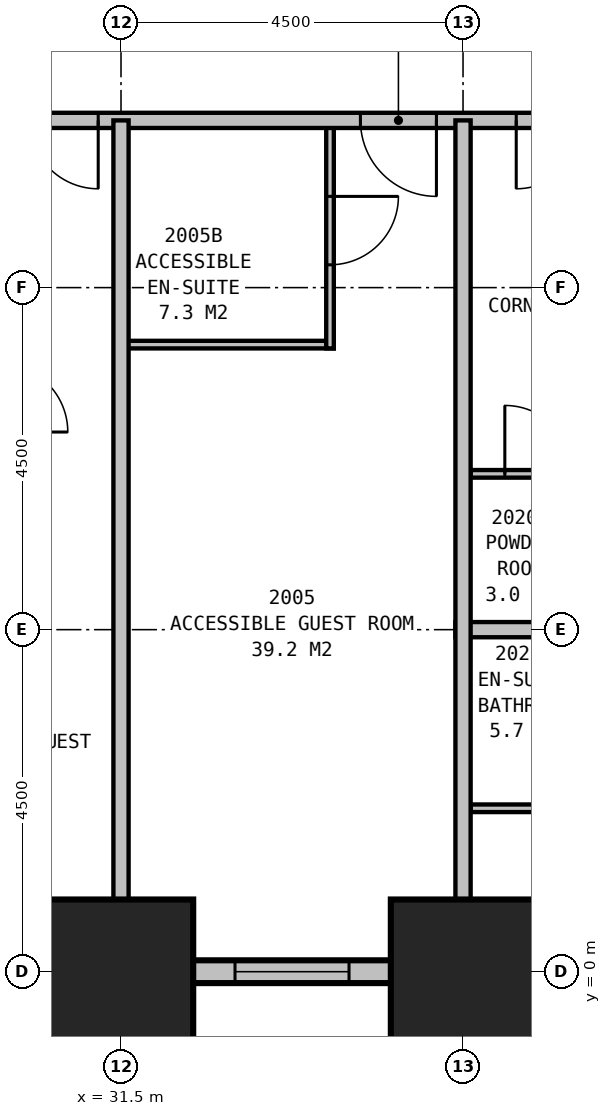
"""IFC4 building model, lengths in metres.
Left out: names, types, materials, properties, quantities, classifications, styles, units other than length and angle.
Written with IfcOpenShell. Run it as: python <this file> out.ifc"""

import sys

from ifc_helpers import new_model, si_unit, direction, frame, frame_2d, origin, origin_2d, place, context, subcontext, project, spatial, rectangle, extrude, element, fill, save


model = new_model("IFC4")
c1 = context("Model", 3, precision=1e-05, world=origin(), true_north=direction((0.0, 1.0)))
c2 = subcontext(c1, "Body", "Model", "MODEL_VIEW")
j1 = project(units=[si_unit("LENGTHUNIT", "METRE"), si_unit("PLANEANGLEUNIT", "RADIAN")], contexts=[c1])
p1 = place(None, origin())
s1 = spatial("IfcSite", under=j1, at=p1, CompositionType="ELEMENT")
p2 = place(p1, origin())
s2 = spatial("IfcBuilding", under=s1, at=p2, CompositionType="ELEMENT")
p3 = place(p2, frame((0.0, 0.0, 82.2)))
s3 = spatial("IfcBuildingStorey", under=s2, at=p3, CompositionType="ELEMENT", Elevation=82.2)
for number, where, z_axis, x_axis in (
    (1, (31.5, 0.0, 0.0), (0.0, 0.0, 1.0), (1.0, 0.0, 0.0)),
    (2, (36.0, 0.0, 0.0), (0.0, 0.0, 1.0), (1.0, 0.0, 0.0)),
):
    element("IfcColumn", number, at=place(p3, frame(where, z_axis=z_axis, x_axis=x_axis)), inside=s3, PredefinedType="COLUMN", context=c2, shape_type="SweptSolid", body=[
        extrude(rectangle(XDim=1.9, YDim=1.9, at=origin_2d()), origin(), (0.0, 0.0, 1.0), 3.5),
    ])
p4 = place(p3, frame((4.35, 0.0, 0.0), z_axis=(0.0, 0.0, 1.0), x_axis=(1.0, 0.0, 0.0)))
e3 = element("IfcWall", 3, at=p4, inside=s3, PredefinedType="STANDARD", context=c2, shape_type="SweptSolid", body=[
    extrude(rectangle(XDim=40.8, YDim=0.3, at=frame_2d((20.4, 0.0))), origin(), (0.0, 0.0, 1.0), 2.1),
])
p5 = place(p4, frame((1.65, 0.0, 0.5)))
e4 = element("IfcOpeningElement", 4, at=p5, cuts=e3, PredefinedType="OPENING", context=c2, shape_type="SweptSolid", body=[
    extrude(rectangle(XDim=1.5, YDim=1.4, at=frame_2d((0.75, 0.7))), frame((0.0, 0.16, 0.0), z_axis=(0.0, -1.0, 0.0), x_axis=(1.0, 0.0, 0.0)), (0.0, 0.0, 1.0), 0.32),
])
p6 = place(p4, frame((6.15, 0.0, 0.5)))
e5 = element("IfcOpeningElement", 5, at=p6, cuts=e3, PredefinedType="OPENING", context=c2, shape_type="SweptSolid", body=[
    extrude(rectangle(XDim=1.5, YDim=1.4, at=frame_2d((0.75, 0.7))), frame((0.0, 0.16, 0.0), z_axis=(0.0, -1.0, 0.0), x_axis=(1.0, 0.0, 0.0)), (0.0, 0.0, 1.0), 0.32),
])
p7 = place(p4, frame((10.65, 0.0, 0.5)))
e6 = element("IfcOpeningElement", 6, at=p7, cuts=e3, PredefinedType="OPENING", context=c2, shape_type="SweptSolid", body=[
    extrude(rectangle(XDim=1.5, YDim=1.4, at=frame_2d((0.75, 0.7))), frame((0.0, 0.16, 0.0), z_axis=(0.0, -1.0, 0.0), x_axis=(1.0, 0.0, 0.0)), (0.0, 0.0, 1.0), 0.32),
])
p8 = place(p4, frame((15.15, 0.0, 0.5)))
e7 = element("IfcOpeningElement", 7, at=p8, cuts=e3, PredefinedType="OPENING", context=c2, shape_type="SweptSolid", body=[
    extrude(rectangle(XDim=1.5, YDim=1.4, at=frame_2d((0.75, 0.7))), frame((0.0, 0.16, 0.0), z_axis=(0.0, -1.0, 0.0), x_axis=(1.0, 0.0, 0.0)), (0.0, 0.0, 1.0), 0.32),
])
p9 = place(p4, frame((19.65, 0.0, 0.5)))
e8 = element("IfcOpeningElement", 8, at=p9, cuts=e3, PredefinedType="OPENING", context=c2, shape_type="SweptSolid", body=[
    extrude(rectangle(XDim=1.5, YDim=1.4, at=frame_2d((0.75, 0.7))), frame((0.0, 0.16, 0.0), z_axis=(0.0, -1.0, 0.0), x_axis=(1.0, 0.0, 0.0)), (0.0, 0.0, 1.0), 0.32),
])
p10 = place(p4, frame((24.15, 0.0, 0.5)))
e9 = element("IfcOpeningElement", 9, at=p10, cuts=e3, PredefinedType="OPENING", context=c2, shape_type="SweptSolid", body=[
    extrude(rectangle(XDim=1.5, YDim=1.4, at=frame_2d((0.75, 0.7))), frame((0.0, 0.16, 0.0), z_axis=(0.0, -1.0, 0.0), x_axis=(1.0, 0.0, 0.0)), (0.0, 0.0, 1.0), 0.32),
])
p11 = place(p4, frame((28.65, 0.0, 0.5)))
e10 = element("IfcOpeningElement", 10, at=p11, cuts=e3, PredefinedType="OPENING", context=c2, shape_type="SweptSolid", body=[
    extrude(rectangle(XDim=1.5, YDim=1.4, at=frame_2d((0.75, 0.7))), frame((0.0, 0.16, 0.0), z_axis=(0.0, -1.0, 0.0), x_axis=(1.0, 0.0, 0.0)), (0.0, 0.0, 1.0), 0.32),
])
p12 = place(p4, frame((33.15, 0.0, 0.5)))
e11 = element("IfcOpeningElement", 11, at=p12, cuts=e3, PredefinedType="OPENING", context=c2, shape_type="SweptSolid", body=[
    extrude(rectangle(XDim=1.5, YDim=1.4, at=frame_2d((0.75, 0.7))), frame((0.0, 0.16, 0.0), z_axis=(0.0, -1.0, 0.0), x_axis=(1.0, 0.0, 0.0)), (0.0, 0.0, 1.0), 0.32),
])
p13 = place(p4, frame((37.65, 0.0, 0.5)))
e12 = element("IfcOpeningElement", 12, at=p13, cuts=e3, PredefinedType="OPENING", context=c2, shape_type="SweptSolid", body=[
    extrude(rectangle(XDim=1.5, YDim=1.4, at=frame_2d((0.75, 0.7))), frame((0.0, 0.16, 0.0), z_axis=(0.0, -1.0, 0.0), x_axis=(1.0, 0.0, 0.0)), (0.0, 0.0, 1.0), 0.32),
])
p14 = place(p3, frame((11.2, 11.2, 0.0), z_axis=(0.0, 0.0, 1.0), x_axis=(1.0, 0.0, 0.0)))
e13 = element("IfcWall", 13, at=p14, inside=s3, PredefinedType="PARTITIONING", context=c2, shape_type="SweptSolid", body=[
    extrude(rectangle(XDim=27.1, YDim=0.2, at=frame_2d((13.55, 0.0))), origin(), (0.0, 0.0, 1.0), 3.25),
])
p15 = place(p14, frame((6.45, 0.0, 0.0), z_axis=(0.0, 0.0, 1.0), x_axis=(-1.0, 0.0, 0.0)))
e14 = element("IfcOpeningElement", 14, at=p15, cuts=e13, PredefinedType="OPENING", context=c2, shape_type="SweptSolid", body=[
    extrude(rectangle(XDim=1.0, YDim=2.1, at=frame_2d((0.5, 1.05))), frame((0.0, 0.11, 0.0), z_axis=(0.0, -1.0, 0.0), x_axis=(1.0, 0.0, 0.0)), (0.0, 0.0, 1.0), 0.22),
])
p16 = place(p14, frame((9.55, 0.0, 0.0), z_axis=(0.0, 0.0, 1.0), x_axis=(-1.0, 0.0, 0.0)))
e15 = element("IfcOpeningElement", 15, at=p16, cuts=e13, PredefinedType="OPENING", context=c2, shape_type="SweptSolid", body=[
    extrude(rectangle(XDim=0.9, YDim=2.1, at=frame_2d((0.45, 1.05))), frame((0.0, 0.11, 0.0), z_axis=(0.0, -1.0, 0.0), x_axis=(1.0, 0.0, 0.0)), (0.0, 0.0, 1.0), 0.22),
])
p17 = place(p14, frame((15.95, 0.0, 0.0), z_axis=(0.0, 0.0, 1.0), x_axis=(-1.0, 0.0, 0.0)))
e16 = element("IfcOpeningElement", 16, at=p17, cuts=e13, PredefinedType="OPENING", context=c2, shape_type="SweptSolid", body=[
    extrude(rectangle(XDim=0.9, YDim=2.1, at=frame_2d((0.45, 1.05))), frame((0.0, 0.11, 0.0), z_axis=(0.0, -1.0, 0.0), x_axis=(1.0, 0.0, 0.0)), (0.0, 0.0, 1.0), 0.22),
])
p18 = place(p14, frame((20.0, 0.0, 0.0), z_axis=(0.0, 0.0, 1.0), x_axis=(-1.0, 0.0, 0.0)))
e17 = element("IfcOpeningElement", 17, at=p18, cuts=e13, PredefinedType="OPENING", context=c2, shape_type="SweptSolid", body=[
    extrude(rectangle(XDim=0.9, YDim=2.1, at=frame_2d((0.45, 1.05))), frame((0.0, 0.11, 0.0), z_axis=(0.0, -1.0, 0.0), x_axis=(1.0, 0.0, 0.0)), (0.0, 0.0, 1.0), 0.22),
])
p19 = place(p14, frame((24.45, 0.0, 0.0), z_axis=(0.0, 0.0, 1.0), x_axis=(-1.0, 0.0, 0.0)))
e18 = element("IfcOpeningElement", 18, at=p19, cuts=e13, PredefinedType="OPENING", context=c2, shape_type="SweptSolid", body=[
    extrude(rectangle(XDim=1.0, YDim=2.1, at=frame_2d((0.5, 1.05))), frame((0.0, 0.11, 0.0), z_axis=(0.0, -1.0, 0.0), x_axis=(1.0, 0.0, 0.0)), (0.0, 0.0, 1.0), 0.22),
])
p20 = place(p14, frame((1.6, 0.0, 0.0), z_axis=(0.0, 0.0, 1.0), x_axis=(-1.0, 0.0, 0.0)))
e19 = element("IfcOpeningElement", 19, at=p20, cuts=e13, PredefinedType="OPENING", context=c2, shape_type="SweptSolid", body=[
    extrude(rectangle(XDim=0.9, YDim=2.1, at=frame_2d((0.45, 1.05))), frame((0.0, 0.11, 0.0), z_axis=(0.0, -1.0, 0.0), x_axis=(1.0, 0.0, 0.0)), (0.0, 0.0, 1.0), 0.22),
])
p21 = place(p14, frame((26.4, 0.0, 0.0), z_axis=(0.0, 0.0, 1.0), x_axis=(-1.0, 0.0, 0.0)))
e20 = element("IfcOpeningElement", 20, at=p21, cuts=e13, PredefinedType="OPENING", context=c2, shape_type="SweptSolid", body=[
    extrude(rectangle(XDim=0.9, YDim=2.1, at=frame_2d((0.45, 1.05))), frame((0.0, 0.11, 0.0), z_axis=(0.0, -1.0, 0.0), x_axis=(1.0, 0.0, 0.0)), (0.0, 0.0, 1.0), 0.22),
])
p22 = place(p3, frame((31.5, 11.2, 0.0), z_axis=(0.0, 0.0, 1.0), x_axis=(0.0, -1.0, 0.0)))
e21 = element("IfcWall", 21, at=p22, inside=s3, PredefinedType="PARTITIONING", context=c2, shape_type="SweptSolid", body=[
    extrude(rectangle(XDim=11.2, YDim=0.2, at=frame_2d((5.6, 0.0))), origin(), (0.0, 0.0, 1.0), 2.2),
])
p23 = place(p3, frame((31.5, 8.25, 0.0), z_axis=(0.0, 0.0, 1.0), x_axis=(1.0, 0.0, 0.0)))
e22 = element("IfcWall", 22, at=p23, inside=s3, PredefinedType="PLUMBINGWALL", context=c2, shape_type="SweptSolid", body=[
    extrude(rectangle(XDim=2.8, YDim=0.1, at=frame_2d((1.4, 0.0))), origin(), (0.0, 0.0, 1.0), 3.25),
])
p24 = place(p3, frame((34.25, 11.2, 0.0), z_axis=(0.0, 0.0, 1.0), x_axis=(0.0, -1.0, 0.0)))
e23 = element("IfcWall", 23, at=p24, inside=s3, PredefinedType="PLUMBINGWALL", context=c2, shape_type="SweptSolid", body=[
    extrude(rectangle(XDim=3.0, YDim=0.1, at=frame_2d((1.5, 0.0))), origin(), (0.0, 0.0, 1.0), 3.25),
])
p25 = place(p24, frame((1.0, 0.0, 0.0)))
e24 = element("IfcOpeningElement", 24, at=p25, cuts=e23, PredefinedType="OPENING", context=c2, shape_type="SweptSolid", body=[
    extrude(rectangle(XDim=0.9, YDim=2.1, at=frame_2d((0.45, 1.05))), frame((0.0, 0.06, 0.0), z_axis=(0.0, -1.0, 0.0), x_axis=(1.0, 0.0, 0.0)), (0.0, 0.0, 1.0), 0.12),
])
p26 = place(p3, frame((36.0, 11.2, 0.0), z_axis=(0.0, 0.0, 1.0), x_axis=(0.0, -1.0, 0.0)))
e25 = element("IfcWall", 25, at=p26, inside=s3, PredefinedType="PARTITIONING", context=c2, shape_type="SweptSolid", body=[
    extrude(rectangle(XDim=11.2, YDim=0.2, at=frame_2d((5.6, 0.0))), origin(), (0.0, 0.0, 1.0), 2.2),
])
p27 = place(p3, frame((35.9, 4.5, 0.0), z_axis=(0.0, 0.0, 1.0), x_axis=(1.0, 0.0, 0.0)))
e26 = element("IfcWall", 26, at=p27, inside=s3, PredefinedType="PARTITIONING", context=c2, shape_type="SweptSolid", body=[
    extrude(rectangle(XDim=9.1, YDim=0.2, at=frame_2d((4.55, 0.0))), origin(), (0.0, 0.0, 1.0), 3.25),
])
p28 = place(p27, frame((7.1, 0.0, 0.0)))
e27 = element("IfcOpeningElement", 27, at=p28, cuts=e26, PredefinedType="OPENING", context=c2, shape_type="SweptSolid", body=[
    extrude(rectangle(XDim=0.9, YDim=2.1, at=frame_2d((0.45, 1.05))), frame((0.0, 0.11, 0.0), z_axis=(0.0, -1.0, 0.0), x_axis=(1.0, 0.0, 0.0)), (0.0, 0.0, 1.0), 0.22),
])
p29 = place(p3, frame((36.1, 6.55, 0.0), z_axis=(0.0, 0.0, 1.0), x_axis=(1.0, 0.0, 0.0)))
e28 = element("IfcWall", 28, at=p29, inside=s3, PredefinedType="PLUMBINGWALL", context=c2, shape_type="SweptSolid", body=[
    extrude(rectangle(XDim=1.8, YDim=0.1, at=frame_2d((0.9, 0.0))), origin(), (0.0, 0.0, 1.0), 3.25),
])
p30 = place(p29, frame((0.45, 0.0, 0.0)))
e29 = element("IfcOpeningElement", 29, at=p30, cuts=e28, PredefinedType="OPENING", context=c2, shape_type="SweptSolid", body=[
    extrude(rectangle(XDim=0.9, YDim=2.1, at=frame_2d((0.45, 1.05))), frame((0.0, 0.06, 0.0), z_axis=(0.0, -1.0, 0.0), x_axis=(1.0, 0.0, 0.0)), (0.0, 0.0, 1.0), 0.12),
])
p31 = place(p3, frame((36.1, 2.15, 0.0), z_axis=(0.0, 0.0, 1.0), x_axis=(1.0, 0.0, 0.0)))
e30 = element("IfcWall", 30, at=p31, inside=s3, PredefinedType="PLUMBINGWALL", context=c2, shape_type="SweptSolid", body=[
    extrude(rectangle(XDim=2.7, YDim=0.1, at=frame_2d((1.35, 0.0))), origin(), (0.0, 0.0, 1.0), 3.25),
])
p32 = place(p31, frame((1.8, 0.0, 0.0), z_axis=(0.0, 0.0, 1.0), x_axis=(-1.0, 0.0, 0.0)))
e31 = element("IfcOpeningElement", 31, at=p32, cuts=e30, PredefinedType="OPENING", context=c2, shape_type="SweptSolid", body=[
    extrude(rectangle(XDim=0.9, YDim=2.1, at=frame_2d((0.45, 1.05))), frame((0.0, 0.06, 0.0), z_axis=(0.0, -1.0, 0.0), x_axis=(1.0, 0.0, 0.0)), (0.0, 0.0, 1.0), 0.12),
])
p33 = place(p11, origin())
e32 = element("IfcWindow", 32, at=p33, inside=s3, PartitioningType="SINGLE_PANEL", PredefinedType="WINDOW", context=c2, shape_type="SweptSolid", body=[
    extrude(rectangle(XDim=1.5, YDim=1.4, at=frame_2d((0.75, 0.7))), frame((0.0, 0.03, 0.0), z_axis=(0.0, -1.0, 0.0), x_axis=(1.0, 0.0, 0.0)), (0.0, 0.0, 1.0), 0.06),
])
fill(e10, e32)
p34 = place(p18, origin())
e33 = element("IfcDoor", 33, at=p34, inside=s3, OperationType="SINGLE_SWING_LEFT", PredefinedType="DOOR", context=c2, shape_type="SweptSolid", body=[
    extrude(rectangle(XDim=0.9, YDim=2.1, at=frame_2d((0.45, 1.05))), frame((0.0, 0.025, 0.0), z_axis=(0.0, -1.0, 0.0), x_axis=(1.0, 0.0, 0.0)), (0.0, 0.0, 1.0), 0.05),
])
fill(e17, e33)
p35 = place(p19, origin())
e34 = element("IfcDoor", 34, at=p35, inside=s3, OperationType="SINGLE_SWING_LEFT", PredefinedType="DOOR", context=c2, shape_type="SweptSolid", body=[
    extrude(rectangle(XDim=1.0, YDim=2.1, at=frame_2d((0.5, 1.05))), frame((0.0, 0.025, 0.0), z_axis=(0.0, -1.0, 0.0), x_axis=(1.0, 0.0, 0.0)), (0.0, 0.0, 1.0), 0.05),
])
fill(e18, e34)
p36 = place(p21, origin())
e35 = element("IfcDoor", 35, at=p36, inside=s3, OperationType="SINGLE_SWING_RIGHT", PredefinedType="DOOR", context=c2, shape_type="SweptSolid", body=[
    extrude(rectangle(XDim=0.9, YDim=2.1, at=frame_2d((0.45, 1.05))), frame((0.0, 0.025, 0.0), z_axis=(0.0, -1.0, 0.0), x_axis=(1.0, 0.0, 0.0)), (0.0, 0.0, 1.0), 0.05),
])
fill(e20, e35)
p37 = place(p25, origin())
e36 = element("IfcDoor", 36, at=p37, inside=s3, OperationType="SINGLE_SWING_LEFT", PredefinedType="DOOR", context=c2, shape_type="SweptSolid", body=[
    extrude(rectangle(XDim=0.9, YDim=2.1, at=frame_2d((0.45, 1.05))), frame((0.0, 0.025, 0.0), z_axis=(0.0, -1.0, 0.0), x_axis=(1.0, 0.0, 0.0)), (0.0, 0.0, 1.0), 0.05),
])
fill(e24, e36)
p38 = place(p30, origin())
e37 = element("IfcDoor", 37, at=p38, inside=s3, OperationType="SINGLE_SWING_LEFT", PredefinedType="DOOR", context=c2, shape_type="SweptSolid", body=[
    extrude(rectangle(XDim=0.9, YDim=2.1, at=frame_2d((0.45, 1.05))), frame((0.0, 0.025, 0.0), z_axis=(0.0, -1.0, 0.0), x_axis=(1.0, 0.0, 0.0)), (0.0, 0.0, 1.0), 0.05),
])
fill(e29, e37)
save(model, sys.argv[1])
